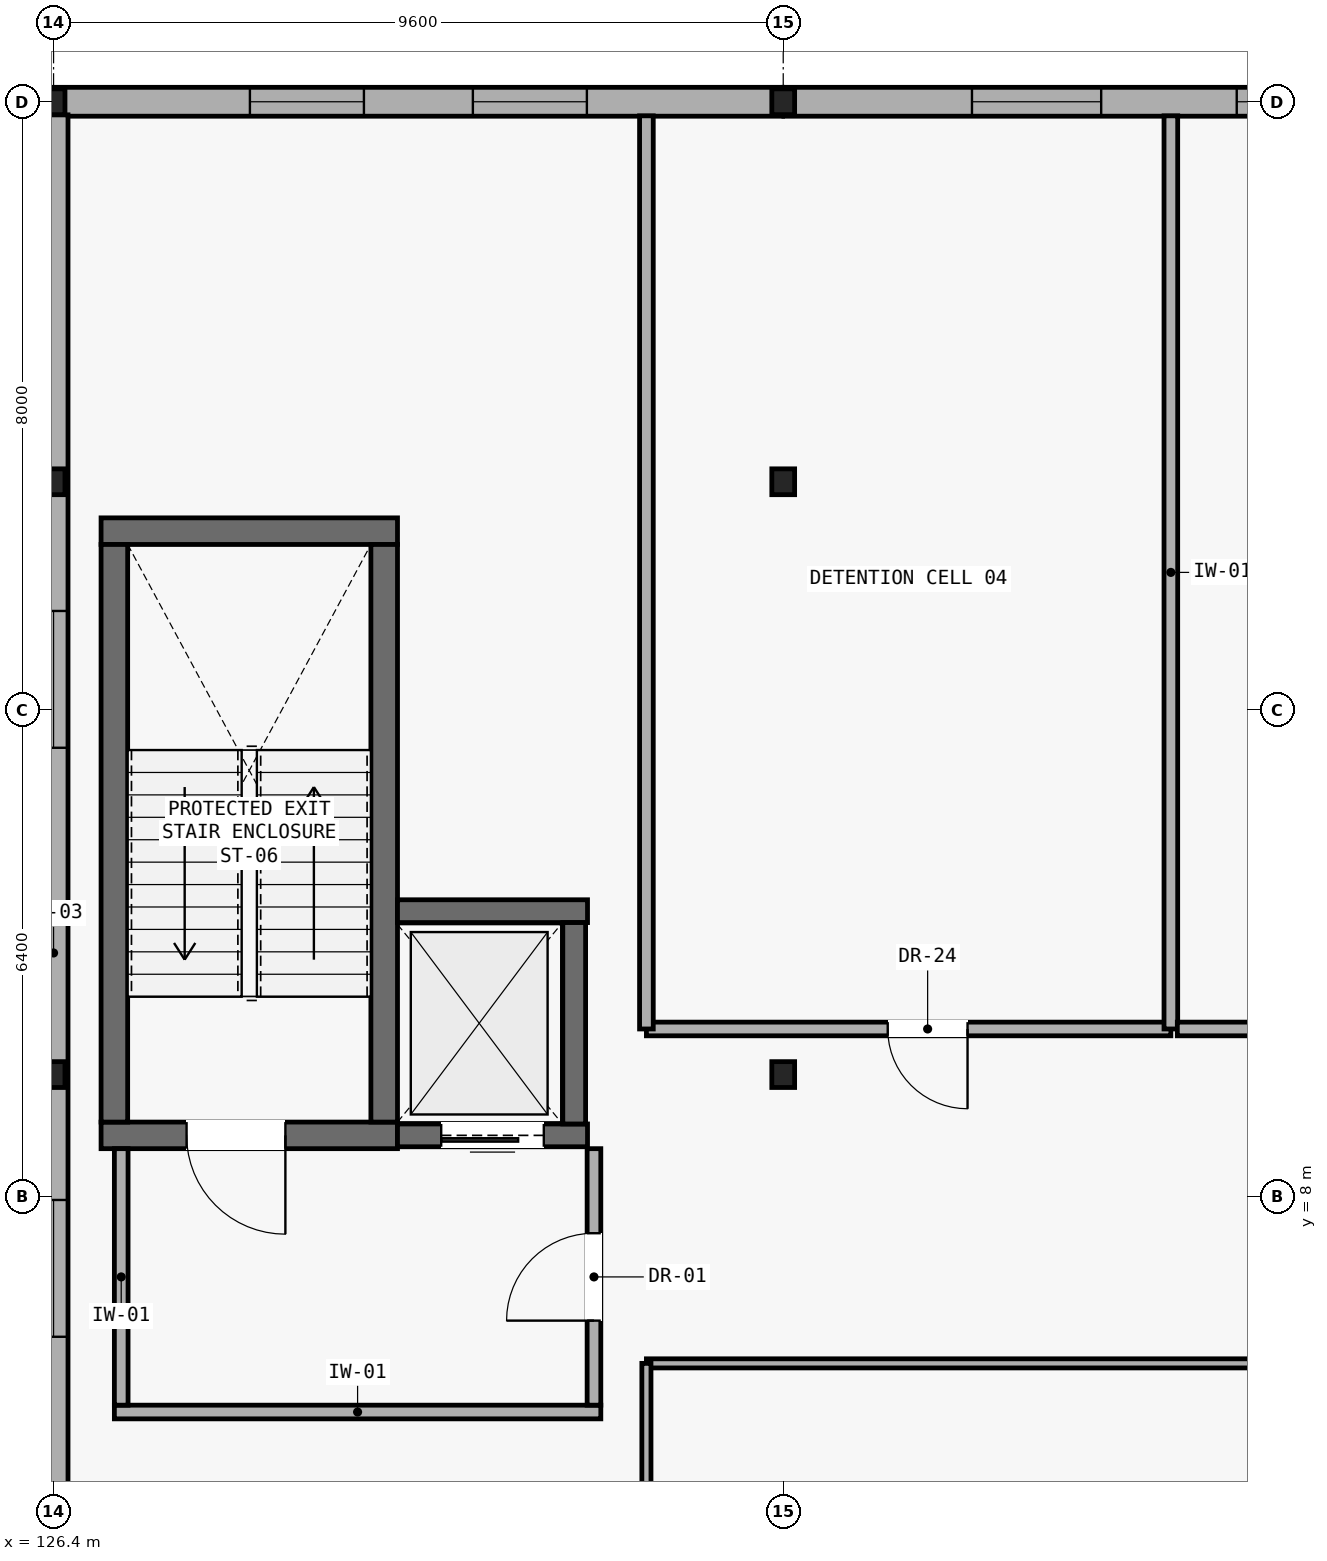
"""IFC4 building model, lengths in metres.
Left out: names, types, materials, properties, quantities, classifications, styles, units other than length and angle.
Written with IfcOpenShell. Run it as: python <this file> out.ifc"""

import sys

from ifc_helpers import new_model, si_unit, direction, frame, frame_2d, origin, origin_2d, place, context, subcontext, project, spatial, rectangle, i_section, extrude, element, fill, save


model = new_model("IFC4")
c1 = context("Model", 3, precision=1e-05, world=origin(), true_north=direction((0.0, 1.0)))
c2 = subcontext(c1, "Body", "Model", "MODEL_VIEW")
j1 = project(units=[si_unit("LENGTHUNIT", "METRE"), si_unit("PLANEANGLEUNIT", "RADIAN")], contexts=[c1])
p1 = place(None, origin())
s1 = spatial("IfcSite", under=j1, at=p1, CompositionType="ELEMENT")
p2 = place(p1, origin())
s2 = spatial("IfcBuilding", under=s1, at=p2, CompositionType="ELEMENT")
p3 = place(p2, frame((0.0, 0.0, 5.25)))
s3 = spatial("IfcBuildingStorey", under=s2, at=p3, CompositionType="ELEMENT", Elevation=5.25)
for number, where, z_axis, x_axis in (
    (1, (126.4, 22.4, 0.0), (0.0, 0.0, 1.0), (1.0, 0.0, 0.0)),
    (2, (126.4, 9.6, 0.0), (0.0, 0.0, 1.0), (1.0, 0.0, 0.0)),
    (3, (126.4, 17.4, 0.0), (0.0, 0.0, 1.0), (1.0, 0.0, 0.0)),
    (4, (136.0, 22.4, 0.0), (0.0, 0.0, 1.0), (1.0, 0.0, 0.0)),
    (5, (136.0, 9.6, 0.0), (0.0, 0.0, 1.0), (1.0, 0.0, 0.0)),
    (6, (136.0, 17.4, 0.0), (0.0, 0.0, 1.0), (1.0, 0.0, 0.0)),
):
    element("IfcColumn", number, at=place(p3, frame(where, z_axis=z_axis, x_axis=x_axis)), inside=s3, PredefinedType="COLUMN", context=c2, shape_type="SweptSolid", body=[
        extrude(i_section(OverallWidth=0.3, OverallDepth=0.34, WebThickness=0.012, FlangeThickness=0.021, FilletRadius=0.027, at=origin_2d()), origin(), (0.0, 0.0, 1.0), 4.2),
    ])
p4 = place(p3, frame((126.408, 22.4, 0.0), z_axis=(0.0, 0.0, 1.0), x_axis=(1.0, 0.0, 0.0)))
e7 = element("IfcWall", 7, at=p4, inside=s3, PredefinedType="SOLIDWALL", context=c2, shape_type="SweptSolid", body=[
    extrude(rectangle(XDim=9.584, YDim=0.38, at=frame_2d((4.792, 0.0))), origin(), (0.0, 0.0, 1.0), 3.635),
])
p5 = place(p4, frame((2.575, 0.0, 1.7)))
e8 = element("IfcOpeningElement", 8, at=p5, cuts=e7, PredefinedType="OPENING", context=c2, shape_type="SweptSolid", body=[
    extrude(rectangle(XDim=1.5, YDim=0.7, at=frame_2d((0.75, 0.35))), frame((0.0, 0.2, 0.0), z_axis=(0.0, -1.0, 0.0), x_axis=(1.0, 0.0, 0.0)), (0.0, 0.0, 1.0), 0.4),
])
p6 = place(p4, frame((5.509, 0.0, 1.7)))
e9 = element("IfcOpeningElement", 9, at=p6, cuts=e7, PredefinedType="OPENING", context=c2, shape_type="SweptSolid", body=[
    extrude(rectangle(XDim=1.5, YDim=0.7, at=frame_2d((0.75, 0.35))), frame((0.0, 0.2, 0.0), z_axis=(0.0, -1.0, 0.0), x_axis=(1.0, 0.0, 0.0)), (0.0, 0.0, 1.0), 0.4),
])
p7 = place(p3, frame((136.008, 22.4, 0.0), z_axis=(0.0, 0.0, 1.0), x_axis=(1.0, 0.0, 0.0)))
e10 = element("IfcWall", 10, at=p7, inside=s3, PredefinedType="SOLIDWALL", context=c2, shape_type="SweptSolid", body=[
    extrude(rectangle(XDim=9.584, YDim=0.38, at=frame_2d((4.792, 0.0))), origin(), (0.0, 0.0, 1.0), 3.635),
])
p8 = place(p7, frame((2.475, 0.0, 1.7)))
e11 = element("IfcOpeningElement", 11, at=p8, cuts=e10, PredefinedType="OPENING", context=c2, shape_type="SweptSolid", body=[
    extrude(rectangle(XDim=1.7, YDim=0.7, at=frame_2d((0.85, 0.35))), frame((0.0, 0.2, 0.0), z_axis=(0.0, -1.0, 0.0), x_axis=(1.0, 0.0, 0.0)), (0.0, 0.0, 1.0), 0.4),
])
p9 = place(p7, frame((5.959, 0.0, 1.7)))
e12 = element("IfcOpeningElement", 12, at=p9, cuts=e10, PredefinedType="OPENING", context=c2, shape_type="SweptSolid", body=[
    extrude(rectangle(XDim=1.7, YDim=0.7, at=frame_2d((0.85, 0.35))), frame((0.0, 0.2, 0.0), z_axis=(0.0, -1.0, 0.0), x_axis=(1.0, 0.0, 0.0)), (0.0, 0.0, 1.0), 0.4),
])
p10 = place(p3, frame((126.4, 0.172, 0.0), z_axis=(0.0, 0.0, 1.0), x_axis=(0.0, 1.0, 0.0)))
e13 = element("IfcWall", 13, at=p10, inside=s3, PredefinedType="SOLIDWALL", context=c2, shape_type="SweptSolid", body=[
    extrude(rectangle(XDim=22.056, YDim=0.38, at=frame_2d((11.028, 0.0))), origin(), (0.0, 0.0, 1.0), 3.5),
])
p11 = place(p10, frame((5.978, 0.0, 1.7)))
e14 = element("IfcOpeningElement", 14, at=p11, cuts=e13, PredefinedType="OPENING", context=c2, shape_type="SweptSolid", body=[
    extrude(rectangle(XDim=1.8, YDim=0.85, at=frame_2d((0.9, 0.425))), frame((0.0, 0.2, 0.0), z_axis=(0.0, -1.0, 0.0), x_axis=(1.0, 0.0, 0.0)), (0.0, 0.0, 1.0), 0.4),
])
p12 = place(p10, frame((13.728, 0.0, 1.7)))
e15 = element("IfcOpeningElement", 15, at=p12, cuts=e13, PredefinedType="OPENING", context=c2, shape_type="SweptSolid", body=[
    extrude(rectangle(XDim=1.8, YDim=0.85, at=frame_2d((0.9, 0.425))), frame((0.0, 0.2, 0.0), z_axis=(0.0, -1.0, 0.0), x_axis=(1.0, 0.0, 0.0)), (0.0, 0.0, 1.0), 0.4),
])
p13 = place(p3, frame((127.025, 8.8, 0.0), z_axis=(0.0, 0.0, 1.0), x_axis=(1.0, 0.0, 0.0)))
e16 = element("IfcWall", 16, at=p13, inside=s3, PredefinedType="SHEAR", context=c2, shape_type="SweptSolid", body=[
    extrude(rectangle(XDim=3.9, YDim=0.35, at=frame_2d((1.95, 0.0))), origin(), (0.0, 0.0, 1.0), 3.96),
])
p14 = place(p13, frame((1.125, 0.0, 0.0)))
e17 = element("IfcOpeningElement", 17, at=p14, cuts=e16, PredefinedType="OPENING", context=c2, shape_type="SweptSolid", body=[
    extrude(rectangle(XDim=1.3, YDim=2.15, at=frame_2d((0.65, 1.075))), frame((0.0, 0.185, 0.0), z_axis=(0.0, -1.0, 0.0), x_axis=(1.0, 0.0, 0.0)), (0.0, 0.0, 1.0), 0.37),
])
p15 = place(p3, frame((127.025, 16.75, 0.0), z_axis=(0.0, 0.0, 1.0), x_axis=(1.0, 0.0, 0.0)))
e18 = element("IfcWall", 18, at=p15, inside=s3, PredefinedType="SHEAR", context=c2, shape_type="SweptSolid", body=[
    extrude(rectangle(XDim=3.9, YDim=0.35, at=frame_2d((1.95, 0.0))), origin(), (0.0, 0.0, 1.0), 3.96),
])
for number, where, z_axis, x_axis in (
    (19, (127.2, 8.975, 0.0), (0.0, 0.0, 1.0), (0.0, 1.0, 0.0)),
    (20, (130.75, 8.975, 0.0), (0.0, 0.0, 1.0), (0.0, 1.0, 0.0)),
):
    element("IfcWall", number, at=place(p3, frame(where, z_axis=z_axis, x_axis=x_axis)), inside=s3, PredefinedType="SHEAR", context=c2, shape_type="SweptSolid", body=[
        extrude(rectangle(XDim=7.6, YDim=0.35, at=frame_2d((3.8, 0.0))), origin(), (0.0, 0.0, 1.0), 3.96),
    ])
p16 = place(p3, frame((130.925, 8.8, 0.0), z_axis=(0.0, 0.0, 1.0), x_axis=(1.0, 0.0, 0.0)))
e21 = element("IfcWall", 21, at=p16, inside=s3, PredefinedType="SHEAR", context=c2, shape_type="SweptSolid", body=[
    extrude(rectangle(XDim=2.5, YDim=0.3, at=frame_2d((1.25, 0.0))), origin(), (0.0, 0.0, 1.0), 3.96),
])
p17 = place(p16, frame((0.575, 0.0, 0.0)))
e22 = element("IfcOpeningElement", 22, at=p17, cuts=e21, PredefinedType="OPENING", context=c2, shape_type="SweptSolid", body=[
    extrude(rectangle(XDim=1.35, YDim=2.15, at=frame_2d((0.675, 1.075))), frame((0.0, 0.16, 0.0), z_axis=(0.0, -1.0, 0.0), x_axis=(1.0, 0.0, 0.0)), (0.0, 0.0, 1.0), 0.32),
])
p18 = place(p3, frame((130.925, 11.75, 0.0), z_axis=(0.0, 0.0, 1.0), x_axis=(1.0, 0.0, 0.0)))
e23 = element("IfcWall", 23, at=p18, inside=s3, PredefinedType="SHEAR", context=c2, shape_type="SweptSolid", body=[
    extrude(rectangle(XDim=2.5, YDim=0.3, at=frame_2d((1.25, 0.0))), origin(), (0.0, 0.0, 1.0), 3.96),
])
p19 = place(p3, frame((133.25, 8.95, 0.0), z_axis=(0.0, 0.0, 1.0), x_axis=(0.0, 1.0, 0.0)))
e24 = element("IfcWall", 24, at=p19, inside=s3, PredefinedType="SHEAR", context=c2, shape_type="SweptSolid", body=[
    extrude(rectangle(XDim=2.65, YDim=0.3, at=frame_2d((1.325, 0.0))), origin(), (0.0, 0.0, 1.0), 3.96),
])
p20 = place(p3, frame((127.2, 5.16, 0.0), z_axis=(0.0, 0.0, 1.0), x_axis=(1.0, 0.0, 0.0)))
e25 = element("IfcWall", 25, at=p20, inside=s3, PredefinedType="PARTITIONING", context=c2, shape_type="SweptSolid", body=[
    extrude(rectangle(XDim=6.4, YDim=0.18, at=frame_2d((3.2, 0.0))), origin(), (0.0, 0.0, 1.0), 3.96),
])
p21 = place(p3, frame((127.29, 5.25, 0.0), z_axis=(0.0, 0.0, 1.0), x_axis=(0.0, 1.0, 0.0)))
e26 = element("IfcWall", 26, at=p21, inside=s3, PredefinedType="PARTITIONING", context=c2, shape_type="SweptSolid", body=[
    extrude(rectangle(XDim=3.375, YDim=0.18, at=frame_2d((1.688, 0.0))), origin(), (0.0, 0.0, 1.0), 3.96),
])
p22 = place(p3, frame((133.51, 5.25, 0.0), z_axis=(0.0, 0.0, 1.0), x_axis=(0.0, 1.0, 0.0)))
e27 = element("IfcWall", 27, at=p22, inside=s3, PredefinedType="PARTITIONING", context=c2, shape_type="SweptSolid", body=[
    extrude(rectangle(XDim=3.375, YDim=0.18, at=frame_2d((1.688, 0.0))), origin(), (0.0, 0.0, 1.0), 3.96),
])
p23 = place(p22, frame((1.113, 0.0, 0.0)))
e28 = element("IfcOpeningElement", 28, at=p23, cuts=e27, PredefinedType="OPENING", context=c2, shape_type="SweptSolid", body=[
    extrude(rectangle(XDim=1.15, YDim=2.15, at=frame_2d((0.575, 1.075))), frame((0.0, 0.1, 0.0), z_axis=(0.0, -1.0, 0.0), x_axis=(1.0, 0.0, 0.0)), (0.0, 0.0, 1.0), 0.2),
])
p24 = place(p3, frame((134.2, 10.2, 0.0), z_axis=(0.0, 0.0, 1.0), x_axis=(1.0, 0.0, 0.0)))
e29 = element("IfcWall", 29, at=p24, inside=s3, PredefinedType="PARTITIONING", context=c2, shape_type="SweptSolid", body=[
    extrude(rectangle(XDim=6.9, YDim=0.18, at=frame_2d((3.45, 0.0))), origin(), (0.0, 0.0, 1.0), 3.96),
])
p25 = place(p24, frame((3.175, 0.0, 0.0)))
e30 = element("IfcOpeningElement", 30, at=p25, cuts=e29, PredefinedType="OPENING", context=c2, shape_type="SweptSolid", body=[
    extrude(rectangle(XDim=1.05, YDim=2.1, at=frame_2d((0.525, 1.05))), frame((0.0, 0.1, 0.0), z_axis=(0.0, -1.0, 0.0), x_axis=(1.0, 0.0, 0.0)), (0.0, 0.0, 1.0), 0.2),
])
for number, where, z_axis, x_axis in (
    (31, (141.1, 10.2, 0.0), (0.0, 0.0, 1.0), (0.0, 1.0, 0.0)),
    (32, (134.2, 22.215, 0.0), (0.0, 0.0, 1.0), (0.0, -1.0, 0.0)),
):
    element("IfcWall", number, at=place(p3, frame(where, z_axis=z_axis, x_axis=x_axis)), inside=s3, PredefinedType="PARTITIONING", context=c2, shape_type="SweptSolid", body=[
        extrude(rectangle(XDim=12.015, YDim=0.18, at=frame_2d((6.008, 0.0))), origin(), (0.0, 0.0, 1.0), 3.96),
    ])
p26 = place(p3, frame((141.185, 10.2, 0.0), z_axis=(0.0, 0.0, 1.0), x_axis=(1.0, 0.0, 0.0)))
e33 = element("IfcWall", 33, at=p26, inside=s3, PredefinedType="PARTITIONING", context=c2, shape_type="SweptSolid", body=[
    extrude(rectangle(XDim=7.115, YDim=0.18, at=frame_2d((3.558, 0.0))), origin(), (0.0, 0.0, 1.0), 3.96),
])
p27 = place(p26, frame((2.032, 0.0, 0.0)))
e34 = element("IfcOpeningElement", 34, at=p27, cuts=e33, PredefinedType="OPENING", context=c2, shape_type="SweptSolid", body=[
    extrude(rectangle(XDim=1.05, YDim=2.1, at=frame_2d((0.525, 1.05))), frame((0.0, 0.1, 0.0), z_axis=(0.0, -1.0, 0.0), x_axis=(1.0, 0.0, 0.0)), (0.0, 0.0, 1.0), 0.2),
])
p28 = place(p3, frame((154.8, 5.8, 0.0), z_axis=(0.0, 0.0, 1.0), x_axis=(-1.0, 0.0, 0.0)))
e35 = element("IfcWall", 35, at=p28, inside=s3, PredefinedType="PARTITIONING", context=c2, shape_type="SweptSolid", body=[
    extrude(rectangle(XDim=20.6, YDim=0.12, at=frame_2d((10.3, 0.0))), origin(), (0.0, 0.0, 1.0), 3.96),
])
p29 = place(p28, frame((9.79, 0.0, 0.0)))
e36 = element("IfcOpeningElement", 36, at=p29, cuts=e35, PredefinedType="OPENING", context=c2, shape_type="SweptSolid", body=[
    extrude(rectangle(XDim=1.02, YDim=2.1, at=frame_2d((0.51, 1.05))), frame((0.0, 0.07, 0.0), z_axis=(0.0, -1.0, 0.0), x_axis=(1.0, 0.0, 0.0)), (0.0, 0.0, 1.0), 0.14),
])
p30 = place(p3, frame((134.2, 5.8, 0.0), z_axis=(0.0, 0.0, 1.0), x_axis=(0.0, -1.0, 0.0)))
e37 = element("IfcWall", 37, at=p30, inside=s3, PredefinedType="PARTITIONING", context=c2, shape_type="SweptSolid", body=[
    extrude(rectangle(XDim=5.615, YDim=0.12, at=frame_2d((2.808, 0.0))), origin(), (0.0, 0.0, 1.0), 3.96),
])
p31 = place(p5, origin())
e38 = element("IfcWindow", 38, at=p31, inside=s3, PartitioningType="SINGLE_PANEL", PredefinedType="WINDOW", context=c2, shape_type="SweptSolid", body=[
    extrude(rectangle(XDim=1.5, YDim=0.7, at=frame_2d((0.75, 0.35))), frame((0.0, 0.03, 0.0), z_axis=(0.0, -1.0, 0.0), x_axis=(1.0, 0.0, 0.0)), (0.0, 0.0, 1.0), 0.06),
])
fill(e8, e38)
p32 = place(p6, origin())
e39 = element("IfcWindow", 39, at=p32, inside=s3, PartitioningType="SINGLE_PANEL", PredefinedType="WINDOW", context=c2, shape_type="SweptSolid", body=[
    extrude(rectangle(XDim=1.5, YDim=0.7, at=frame_2d((0.75, 0.35))), frame((0.0, 0.03, 0.0), z_axis=(0.0, -1.0, 0.0), x_axis=(1.0, 0.0, 0.0)), (0.0, 0.0, 1.0), 0.06),
])
fill(e9, e39)
p33 = place(p8, origin())
e40 = element("IfcWindow", 40, at=p33, inside=s3, PartitioningType="SINGLE_PANEL", PredefinedType="WINDOW", context=c2, shape_type="SweptSolid", body=[
    extrude(rectangle(XDim=1.7, YDim=0.7, at=frame_2d((0.85, 0.35))), frame((0.0, 0.03, 0.0), z_axis=(0.0, -1.0, 0.0), x_axis=(1.0, 0.0, 0.0)), (0.0, 0.0, 1.0), 0.06),
])
fill(e11, e40)
p34 = place(p9, origin())
e41 = element("IfcWindow", 41, at=p34, inside=s3, PartitioningType="SINGLE_PANEL", PredefinedType="WINDOW", context=c2, shape_type="SweptSolid", body=[
    extrude(rectangle(XDim=1.7, YDim=0.7, at=frame_2d((0.85, 0.35))), frame((0.0, 0.03, 0.0), z_axis=(0.0, -1.0, 0.0), x_axis=(1.0, 0.0, 0.0)), (0.0, 0.0, 1.0), 0.06),
])
fill(e12, e41)
p35 = place(p11, origin())
e42 = element("IfcWindow", 42, at=p35, inside=s3, PartitioningType="SINGLE_PANEL", PredefinedType="WINDOW", context=c2, shape_type="SweptSolid", body=[
    extrude(rectangle(XDim=1.8, YDim=0.85, at=frame_2d((0.9, 0.425))), frame((0.0, 0.03, 0.0), z_axis=(0.0, -1.0, 0.0), x_axis=(1.0, 0.0, 0.0)), (0.0, 0.0, 1.0), 0.06),
])
fill(e14, e42)
p36 = place(p12, origin())
e43 = element("IfcWindow", 43, at=p36, inside=s3, PartitioningType="SINGLE_PANEL", PredefinedType="WINDOW", context=c2, shape_type="SweptSolid", body=[
    extrude(rectangle(XDim=1.8, YDim=0.85, at=frame_2d((0.9, 0.425))), frame((0.0, 0.03, 0.0), z_axis=(0.0, -1.0, 0.0), x_axis=(1.0, 0.0, 0.0)), (0.0, 0.0, 1.0), 0.06),
])
fill(e15, e43)
p37 = place(p14, frame((1.3, 0.0, 0.0), z_axis=(0.0, 0.0, 1.0), x_axis=(-1.0, 0.0, 0.0)))
e44 = element("IfcDoor", 44, at=p37, inside=s3, OperationType="SINGLE_SWING_RIGHT", PredefinedType="DOOR", context=c2, shape_type="SweptSolid", body=[
    extrude(rectangle(XDim=1.3, YDim=2.15, at=frame_2d((0.65, 1.075))), frame((0.0, 0.025, 0.0), z_axis=(0.0, -1.0, 0.0), x_axis=(1.0, 0.0, 0.0)), (0.0, 0.0, 1.0), 0.05),
])
fill(e17, e44)
p38 = place(p17, frame((1.35, 0.0, 0.0), z_axis=(0.0, 0.0, 1.0), x_axis=(-1.0, 0.0, 0.0)))
e45 = element("IfcDoor", 45, at=p38, inside=s3, OperationType="SLIDING_TO_RIGHT", PredefinedType="DOOR", context=c2, shape_type="SweptSolid", body=[
    extrude(rectangle(XDim=1.35, YDim=2.15, at=frame_2d((0.675, 1.075))), frame((0.0, 0.025, 0.0), z_axis=(0.0, -1.0, 0.0), x_axis=(1.0, 0.0, 0.0)), (0.0, 0.0, 1.0), 0.05),
])
fill(e22, e45)
p39 = place(p23, origin())
e46 = element("IfcDoor", 46, at=p39, inside=s3, OperationType="SINGLE_SWING_LEFT", PredefinedType="DOOR", context=c2, shape_type="SweptSolid", body=[
    extrude(rectangle(XDim=1.15, YDim=2.15, at=frame_2d((0.575, 1.075))), frame((0.0, 0.025, 0.0), z_axis=(0.0, -1.0, 0.0), x_axis=(1.0, 0.0, 0.0)), (0.0, 0.0, 1.0), 0.05),
])
fill(e28, e46)
p40 = place(p25, frame((1.05, 0.0, 0.0), z_axis=(0.0, 0.0, 1.0), x_axis=(-1.0, 0.0, 0.0)))
e47 = element("IfcDoor", 47, at=p40, inside=s3, OperationType="SINGLE_SWING_RIGHT", PredefinedType="DOOR", context=c2, shape_type="SweptSolid", body=[
    extrude(rectangle(XDim=1.05, YDim=2.1, at=frame_2d((0.525, 1.05))), frame((0.0, 0.025, 0.0), z_axis=(0.0, -1.0, 0.0), x_axis=(1.0, 0.0, 0.0)), (0.0, 0.0, 1.0), 0.05),
])
fill(e30, e47)
save(model, sys.argv[1])
